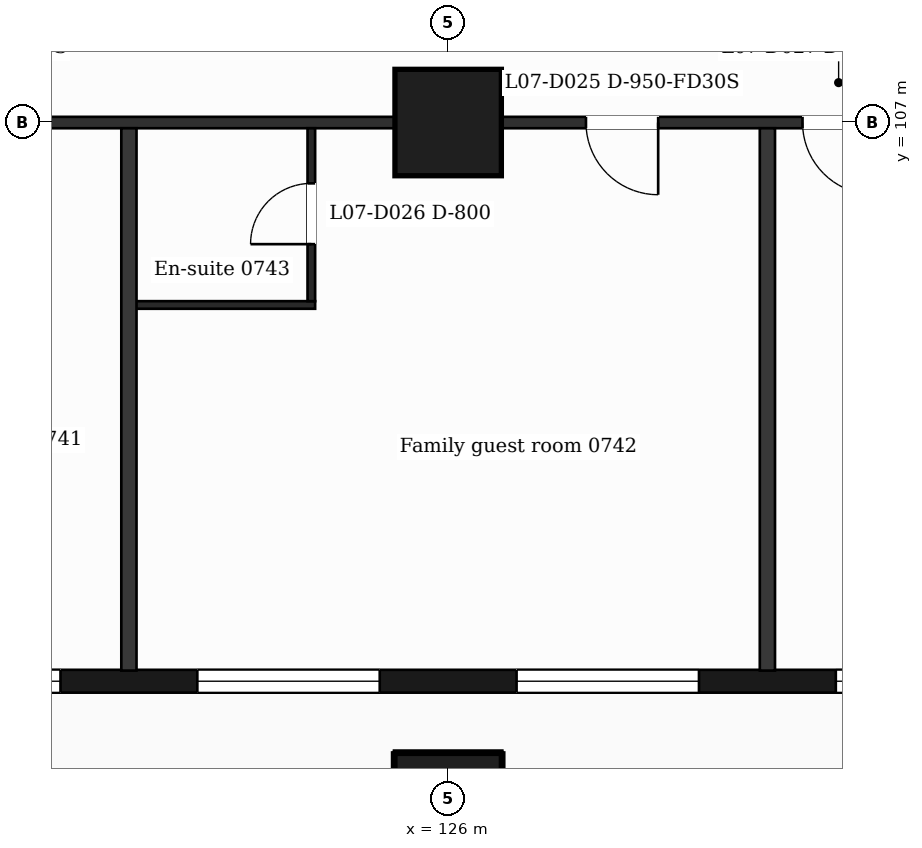
"""IFC4 building model, lengths in metres.
Left out: names, types, materials, properties, quantities, classifications, styles, units other than length and angle.
Written with IfcOpenShell. Run it as: python <this file> out.ifc"""

import sys

from ifc_helpers import new_model, si_unit, direction, frame, frame_2d, origin, origin_2d, place, context, subcontext, project, spatial, rectangle, extrude, element, fill, save


model = new_model("IFC4")
c1 = context("Model", 3, precision=1e-05, world=origin(), true_north=direction((0.0, 1.0)))
c2 = subcontext(c1, "Body", "Model", "MODEL_VIEW")
j1 = project(units=[si_unit("LENGTHUNIT", "METRE"), si_unit("PLANEANGLEUNIT", "RADIAN")], contexts=[c1])
p1 = place(None, origin())
s1 = spatial("IfcSite", under=j1, at=p1, CompositionType="ELEMENT")
p2 = place(p1, origin())
s2 = spatial("IfcBuilding", under=s1, at=p2, CompositionType="ELEMENT")
p3 = place(p2, frame((0.0, 0.0, 42.5)))
s3 = spatial("IfcBuildingStorey", under=s2, at=p3, CompositionType="ELEMENT", Elevation=42.5)
for number, where, z_axis, x_axis in (
    (1, (126.0, 98.0, 0.0), (0.0, 0.0, 1.0), (1.0, 0.0, 0.0)),
    (2, (126.0, 107.0, 0.0), (0.0, 0.0, 1.0), (1.0, 0.0, 0.0)),
):
    element("IfcColumn", number, at=place(p3, frame(where, z_axis=z_axis, x_axis=x_axis)), inside=s3, PredefinedType="COLUMN", context=c2, shape_type="SweptSolid", body=[
        extrude(rectangle(XDim=1.4, YDim=1.4, at=origin_2d()), origin(), (0.0, 0.0, 1.0), 3.5),
    ])
p4 = place(p3, frame((89.85, 99.65, 0.0), z_axis=(0.0, 0.0, 1.0), x_axis=(1.0, 0.0, 0.0)))
e3 = element("IfcWall", 3, at=p4, inside=s3, PredefinedType="SOLIDWALL", context=c2, shape_type="SweptSolid", body=[
    extrude(rectangle(XDim=47.25, YDim=0.3, at=frame_2d((23.625, 0.0))), origin(), (0.0, 0.0, 1.0), 3.18),
])
p5 = place(p4, frame((0.725, 0.0, 0.9)))
e4 = element("IfcOpeningElement", 4, at=p5, cuts=e3, PredefinedType="OPENING", context=c2, shape_type="SweptSolid", body=[
    extrude(rectangle(XDim=1.2, YDim=2.1, at=frame_2d((0.6, 1.05))), frame((0.0, 0.16, 0.0), z_axis=(0.0, -1.0, 0.0), x_axis=(1.0, 0.0, 0.0)), (0.0, 0.0, 1.0), 0.32),
])
p6 = place(p4, frame((3.45, 0.0, 0.9)))
e5 = element("IfcOpeningElement", 5, at=p6, cuts=e3, PredefinedType="OPENING", context=c2, shape_type="SweptSolid", body=[
    extrude(rectangle(XDim=2.4, YDim=2.1, at=frame_2d((1.2, 1.05))), frame((0.0, 0.16, 0.0), z_axis=(0.0, -1.0, 0.0), x_axis=(1.0, 0.0, 0.0)), (0.0, 0.0, 1.0), 0.32),
])
p7 = place(p4, frame((7.35, 0.0, 0.0)))
e6 = element("IfcOpeningElement", 6, at=p7, cuts=e3, PredefinedType="OPENING", context=c2, shape_type="SweptSolid", body=[
    extrude(rectangle(XDim=1.2, YDim=2.4, at=frame_2d((0.6, 1.2))), frame((0.0, 0.16, 0.0), z_axis=(0.0, -1.0, 0.0), x_axis=(1.0, 0.0, 0.0)), (0.0, 0.0, 1.0), 0.32),
])
p8 = place(p4, frame((9.15, 0.0, 0.9)))
e7 = element("IfcOpeningElement", 7, at=p8, cuts=e3, PredefinedType="OPENING", context=c2, shape_type="SweptSolid", body=[
    extrude(rectangle(XDim=1.2, YDim=2.1, at=frame_2d((0.6, 1.05))), frame((0.0, 0.16, 0.0), z_axis=(0.0, -1.0, 0.0), x_axis=(1.0, 0.0, 0.0)), (0.0, 0.0, 1.0), 0.32),
])
p9 = place(p4, frame((11.85, 0.0, 0.9)))
e8 = element("IfcOpeningElement", 8, at=p9, cuts=e3, PredefinedType="OPENING", context=c2, shape_type="SweptSolid", body=[
    extrude(rectangle(XDim=2.4, YDim=2.1, at=frame_2d((1.2, 1.05))), frame((0.0, 0.16, 0.0), z_axis=(0.0, -1.0, 0.0), x_axis=(1.0, 0.0, 0.0)), (0.0, 0.0, 1.0), 0.32),
])
p10 = place(p4, frame((16.05, 0.0, 0.9)))
e9 = element("IfcOpeningElement", 9, at=p10, cuts=e3, PredefinedType="OPENING", context=c2, shape_type="SweptSolid", body=[
    extrude(rectangle(XDim=2.4, YDim=2.1, at=frame_2d((1.2, 1.05))), frame((0.0, 0.16, 0.0), z_axis=(0.0, -1.0, 0.0), x_axis=(1.0, 0.0, 0.0)), (0.0, 0.0, 1.0), 0.32),
])
p11 = place(p4, frame((20.85, 0.0, 0.9)))
e10 = element("IfcOpeningElement", 10, at=p11, cuts=e3, PredefinedType="OPENING", context=c2, shape_type="SweptSolid", body=[
    extrude(rectangle(XDim=1.2, YDim=2.1, at=frame_2d((0.6, 1.05))), frame((0.0, 0.16, 0.0), z_axis=(0.0, -1.0, 0.0), x_axis=(1.0, 0.0, 0.0)), (0.0, 0.0, 1.0), 0.32),
])
p12 = place(p4, frame((25.05, 0.0, 0.9)))
e11 = element("IfcOpeningElement", 11, at=p12, cuts=e3, PredefinedType="OPENING", context=c2, shape_type="SweptSolid", body=[
    extrude(rectangle(XDim=1.2, YDim=2.1, at=frame_2d((0.6, 1.05))), frame((0.0, 0.16, 0.0), z_axis=(0.0, -1.0, 0.0), x_axis=(1.0, 0.0, 0.0)), (0.0, 0.0, 1.0), 0.32),
])
p13 = place(p4, frame((28.65, 0.0, 0.9)))
e12 = element("IfcOpeningElement", 12, at=p13, cuts=e3, PredefinedType="OPENING", context=c2, shape_type="SweptSolid", body=[
    extrude(rectangle(XDim=2.4, YDim=2.1, at=frame_2d((1.2, 1.05))), frame((0.0, 0.16, 0.0), z_axis=(0.0, -1.0, 0.0), x_axis=(1.0, 0.0, 0.0)), (0.0, 0.0, 1.0), 0.32),
])
p14 = place(p4, frame((32.85, 0.0, 0.9)))
e13 = element("IfcOpeningElement", 13, at=p14, cuts=e3, PredefinedType="OPENING", context=c2, shape_type="SweptSolid", body=[
    extrude(rectangle(XDim=2.4, YDim=2.1, at=frame_2d((1.2, 1.05))), frame((0.0, 0.16, 0.0), z_axis=(0.0, -1.0, 0.0), x_axis=(1.0, 0.0, 0.0)), (0.0, 0.0, 1.0), 0.32),
])
p15 = place(p4, frame((37.05, 0.0, 0.9)))
e14 = element("IfcOpeningElement", 14, at=p15, cuts=e3, PredefinedType="OPENING", context=c2, shape_type="SweptSolid", body=[
    extrude(rectangle(XDim=2.4, YDim=2.1, at=frame_2d((1.2, 1.05))), frame((0.0, 0.16, 0.0), z_axis=(0.0, -1.0, 0.0), x_axis=(1.0, 0.0, 0.0)), (0.0, 0.0, 1.0), 0.32),
])
p16 = place(p4, frame((41.25, 0.0, 0.9)))
e15 = element("IfcOpeningElement", 15, at=p16, cuts=e3, PredefinedType="OPENING", context=c2, shape_type="SweptSolid", body=[
    extrude(rectangle(XDim=2.4, YDim=2.1, at=frame_2d((1.2, 1.05))), frame((0.0, 0.16, 0.0), z_axis=(0.0, -1.0, 0.0), x_axis=(1.0, 0.0, 0.0)), (0.0, 0.0, 1.0), 0.32),
])
p17 = place(p4, frame((45.25, 0.0, 0.9)))
e16 = element("IfcOpeningElement", 16, at=p17, cuts=e3, PredefinedType="OPENING", context=c2, shape_type="SweptSolid", body=[
    extrude(rectangle(XDim=1.2, YDim=2.1, at=frame_2d((0.6, 1.05))), frame((0.0, 0.16, 0.0), z_axis=(0.0, -1.0, 0.0), x_axis=(1.0, 0.0, 0.0)), (0.0, 0.0, 1.0), 0.32),
])
p18 = place(p3, frame((121.8, 104.6, 0.0), z_axis=(0.0, 0.0, 1.0), x_axis=(1.0, 0.0, 0.0)))
e17 = element("IfcWall", 17, at=p18, inside=s3, PredefinedType="PARTITIONING", context=c2, shape_type="SweptSolid", body=[
    extrude(rectangle(XDim=2.45, YDim=0.1, at=frame_2d((1.225, 0.0))), origin(), (0.0, 0.0, 1.0), 3.18),
])
p19 = place(p3, frame((87.018, 107.0, 0.0), z_axis=(0.0, 0.0, 1.0), x_axis=(1.0, 0.0, 0.0)))
e18 = element("IfcWall", 18, at=p19, inside=s3, PredefinedType="PARTITIONING", context=c2, shape_type="SweptSolid", body=[
    extrude(rectangle(XDim=52.765, YDim=0.15, at=frame_2d((26.382, 0.0))), origin(), (0.0, 0.0, 1.0), 3.18),
])
p20 = place(p19, frame((1.032, 0.0, 0.0)))
e19 = element("IfcOpeningElement", 19, at=p20, cuts=e18, PredefinedType="OPENING", context=c2, shape_type="SweptSolid", body=[
    extrude(rectangle(XDim=0.95, YDim=2.1, at=frame_2d((0.475, 1.05))), frame((0.0, 0.085, 0.0), z_axis=(0.0, -1.0, 0.0), x_axis=(1.0, 0.0, 0.0)), (0.0, 0.0, 1.0), 0.17),
])
p21 = place(p19, frame((6.369, 0.0, 0.0)))
e20 = element("IfcOpeningElement", 20, at=p21, cuts=e18, PredefinedType="OPENING", context=c2, shape_type="SweptSolid", body=[
    extrude(rectangle(XDim=0.95, YDim=2.1, at=frame_2d((0.475, 1.05))), frame((0.0, 0.085, 0.0), z_axis=(0.0, -1.0, 0.0), x_axis=(1.0, 0.0, 0.0)), (0.0, 0.0, 1.0), 0.17),
])
p22 = place(p19, frame((10.952, 0.0, 0.0)))
e21 = element("IfcOpeningElement", 21, at=p22, cuts=e18, PredefinedType="OPENING", context=c2, shape_type="SweptSolid", body=[
    extrude(rectangle(XDim=0.95, YDim=2.1, at=frame_2d((0.475, 1.05))), frame((0.0, 0.085, 0.0), z_axis=(0.0, -1.0, 0.0), x_axis=(1.0, 0.0, 0.0)), (0.0, 0.0, 1.0), 0.17),
])
p23 = place(p19, frame((16.045, 0.0, 0.0)))
e22 = element("IfcOpeningElement", 22, at=p23, cuts=e18, PredefinedType="OPENING", context=c2, shape_type="SweptSolid", body=[
    extrude(rectangle(XDim=0.95, YDim=2.1, at=frame_2d((0.475, 1.05))), frame((0.0, 0.085, 0.0), z_axis=(0.0, -1.0, 0.0), x_axis=(1.0, 0.0, 0.0)), (0.0, 0.0, 1.0), 0.17),
])
p24 = place(p19, frame((20.245, 0.0, 0.0)))
e23 = element("IfcOpeningElement", 23, at=p24, cuts=e18, PredefinedType="OPENING", context=c2, shape_type="SweptSolid", body=[
    extrude(rectangle(XDim=0.95, YDim=2.1, at=frame_2d((0.475, 1.05))), frame((0.0, 0.085, 0.0), z_axis=(0.0, -1.0, 0.0), x_axis=(1.0, 0.0, 0.0)), (0.0, 0.0, 1.0), 0.17),
])
p25 = place(p19, frame((24.969, 0.0, 0.0)))
e24 = element("IfcOpeningElement", 24, at=p25, cuts=e18, PredefinedType="OPENING", context=c2, shape_type="SweptSolid", body=[
    extrude(rectangle(XDim=0.95, YDim=2.1, at=frame_2d((0.475, 1.05))), frame((0.0, 0.085, 0.0), z_axis=(0.0, -1.0, 0.0), x_axis=(1.0, 0.0, 0.0)), (0.0, 0.0, 1.0), 0.17),
])
p26 = place(p19, frame((26.807, 0.0, 0.0)))
e25 = element("IfcOpeningElement", 25, at=p26, cuts=e18, PredefinedType="OPENING", context=c2, shape_type="SweptSolid", body=[
    extrude(rectangle(XDim=0.95, YDim=2.1, at=frame_2d((0.475, 1.05))), frame((0.0, 0.085, 0.0), z_axis=(0.0, -1.0, 0.0), x_axis=(1.0, 0.0, 0.0)), (0.0, 0.0, 1.0), 0.17),
])
p27 = place(p19, frame((31.952, 0.0, 0.0)))
e26 = element("IfcOpeningElement", 26, at=p27, cuts=e18, PredefinedType="OPENING", context=c2, shape_type="SweptSolid", body=[
    extrude(rectangle(XDim=0.95, YDim=2.1, at=frame_2d((0.475, 1.05))), frame((0.0, 0.085, 0.0), z_axis=(0.0, -1.0, 0.0), x_axis=(1.0, 0.0, 0.0)), (0.0, 0.0, 1.0), 0.17),
])
p28 = place(p19, frame((40.795, 0.0, 0.0)))
e27 = element("IfcOpeningElement", 27, at=p28, cuts=e18, PredefinedType="OPENING", context=c2, shape_type="SweptSolid", body=[
    extrude(rectangle(XDim=0.95, YDim=2.1, at=frame_2d((0.475, 1.05))), frame((0.0, 0.085, 0.0), z_axis=(0.0, -1.0, 0.0), x_axis=(1.0, 0.0, 0.0)), (0.0, 0.0, 1.0), 0.17),
])
p29 = place(p19, frame((43.644, 0.0, 0.0)))
e28 = element("IfcOpeningElement", 28, at=p29, cuts=e18, PredefinedType="OPENING", context=c2, shape_type="SweptSolid", body=[
    extrude(rectangle(XDim=0.95, YDim=2.1, at=frame_2d((0.475, 1.05))), frame((0.0, 0.085, 0.0), z_axis=(0.0, -1.0, 0.0), x_axis=(1.0, 0.0, 0.0)), (0.0, 0.0, 1.0), 0.17),
])
p30 = place(p19, frame((48.767, 0.0, 0.0)))
e29 = element("IfcOpeningElement", 29, at=p30, cuts=e18, PredefinedType="OPENING", context=c2, shape_type="SweptSolid", body=[
    extrude(rectangle(XDim=0.95, YDim=2.1, at=frame_2d((0.475, 1.05))), frame((0.0, 0.085, 0.0), z_axis=(0.0, -1.0, 0.0), x_axis=(1.0, 0.0, 0.0)), (0.0, 0.0, 1.0), 0.17),
])
p31 = place(p3, frame((121.8, 99.79, 0.0), z_axis=(0.0, 0.0, 1.0), x_axis=(0.0, 1.0, 0.0)))
e30 = element("IfcWall", 30, at=p31, inside=s3, PredefinedType="PARTITIONING", context=c2, shape_type="SweptSolid", body=[
    extrude(rectangle(XDim=7.135, YDim=0.2, at=frame_2d((3.567, 0.0))), origin(), (0.0, 0.0, 1.0), 3.18),
])
p32 = place(p3, frame((124.2, 104.65, 0.0), z_axis=(0.0, 0.0, 1.0), x_axis=(0.0, 1.0, 0.0)))
e31 = element("IfcWall", 31, at=p32, inside=s3, PredefinedType="PARTITIONING", context=c2, shape_type="SweptSolid", body=[
    extrude(rectangle(XDim=2.275, YDim=0.1, at=frame_2d((1.138, 0.0))), origin(), (0.0, 0.0, 1.0), 3.18),
])
p33 = place(p32, frame((0.75, 0.0, 0.0)))
e32 = element("IfcOpeningElement", 32, at=p33, cuts=e31, PredefinedType="OPENING", context=c2, shape_type="SweptSolid", body=[
    extrude(rectangle(XDim=0.8, YDim=2.1, at=frame_2d((0.4, 1.05))), frame((0.0, 0.06, 0.0), z_axis=(0.0, -1.0, 0.0), x_axis=(1.0, 0.0, 0.0)), (0.0, 0.0, 1.0), 0.12),
])
p34 = place(p3, frame((130.2, 99.79, 0.0), z_axis=(0.0, 0.0, 1.0), x_axis=(0.0, 1.0, 0.0)))
e33 = element("IfcWall", 33, at=p34, inside=s3, PredefinedType="PARTITIONING", context=c2, shape_type="SweptSolid", body=[
    extrude(rectangle(XDim=7.135, YDim=0.2, at=frame_2d((3.567, 0.0))), origin(), (0.0, 0.0, 1.0), 3.18),
])
p35 = place(p13, origin())
e34 = element("IfcWindow", 34, at=p35, inside=s3, PartitioningType="SINGLE_PANEL", PredefinedType="WINDOW", context=c2, shape_type="SweptSolid", body=[
    extrude(rectangle(XDim=2.4, YDim=2.1, at=frame_2d((1.2, 1.05))), frame((0.0, 0.03, 0.0), z_axis=(0.0, -1.0, 0.0), x_axis=(1.0, 0.0, 0.0)), (0.0, 0.0, 1.0), 0.06),
])
fill(e12, e34)
p36 = place(p14, origin())
e35 = element("IfcWindow", 35, at=p36, inside=s3, PartitioningType="SINGLE_PANEL", PredefinedType="WINDOW", context=c2, shape_type="SweptSolid", body=[
    extrude(rectangle(XDim=2.4, YDim=2.1, at=frame_2d((1.2, 1.05))), frame((0.0, 0.03, 0.0), z_axis=(0.0, -1.0, 0.0), x_axis=(1.0, 0.0, 0.0)), (0.0, 0.0, 1.0), 0.06),
])
fill(e13, e35)
p37 = place(p15, origin())
e36 = element("IfcWindow", 36, at=p37, inside=s3, PartitioningType="SINGLE_PANEL", PredefinedType="WINDOW", context=c2, shape_type="SweptSolid", body=[
    extrude(rectangle(XDim=2.4, YDim=2.1, at=frame_2d((1.2, 1.05))), frame((0.0, 0.03, 0.0), z_axis=(0.0, -1.0, 0.0), x_axis=(1.0, 0.0, 0.0)), (0.0, 0.0, 1.0), 0.06),
])
fill(e14, e36)
p38 = place(p16, origin())
e37 = element("IfcWindow", 37, at=p38, inside=s3, PartitioningType="SINGLE_PANEL", PredefinedType="WINDOW", context=c2, shape_type="SweptSolid", body=[
    extrude(rectangle(XDim=2.4, YDim=2.1, at=frame_2d((1.2, 1.05))), frame((0.0, 0.03, 0.0), z_axis=(0.0, -1.0, 0.0), x_axis=(1.0, 0.0, 0.0)), (0.0, 0.0, 1.0), 0.06),
])
fill(e15, e37)
p39 = place(p28, origin())
e38 = element("IfcDoor", 38, at=p39, inside=s3, OperationType="SINGLE_SWING_RIGHT", PredefinedType="DOOR", context=c2, shape_type="SweptSolid", body=[
    extrude(rectangle(XDim=0.95, YDim=2.1, at=frame_2d((0.475, 1.05))), frame((0.0, 0.025, 0.0), z_axis=(0.0, -1.0, 0.0), x_axis=(1.0, 0.0, 0.0)), (0.0, 0.0, 1.0), 0.05),
])
fill(e27, e38)
p40 = place(p33, origin())
e39 = element("IfcDoor", 39, at=p40, inside=s3, OperationType="SINGLE_SWING_LEFT", PredefinedType="DOOR", context=c2, shape_type="SweptSolid", body=[
    extrude(rectangle(XDim=0.8, YDim=2.1, at=frame_2d((0.4, 1.05))), frame((0.0, 0.025, 0.0), z_axis=(0.0, -1.0, 0.0), x_axis=(1.0, 0.0, 0.0)), (0.0, 0.0, 1.0), 0.05),
])
fill(e32, e39)
p41 = place(p29, origin())
e40 = element("IfcDoor", 40, at=p41, inside=s3, OperationType="SINGLE_SWING_RIGHT", PredefinedType="DOOR", context=c2, shape_type="SweptSolid", body=[
    extrude(rectangle(XDim=0.95, YDim=2.1, at=frame_2d((0.475, 1.05))), frame((0.0, 0.025, 0.0), z_axis=(0.0, -1.0, 0.0), x_axis=(1.0, 0.0, 0.0)), (0.0, 0.0, 1.0), 0.05),
])
fill(e28, e40)
save(model, sys.argv[1])
